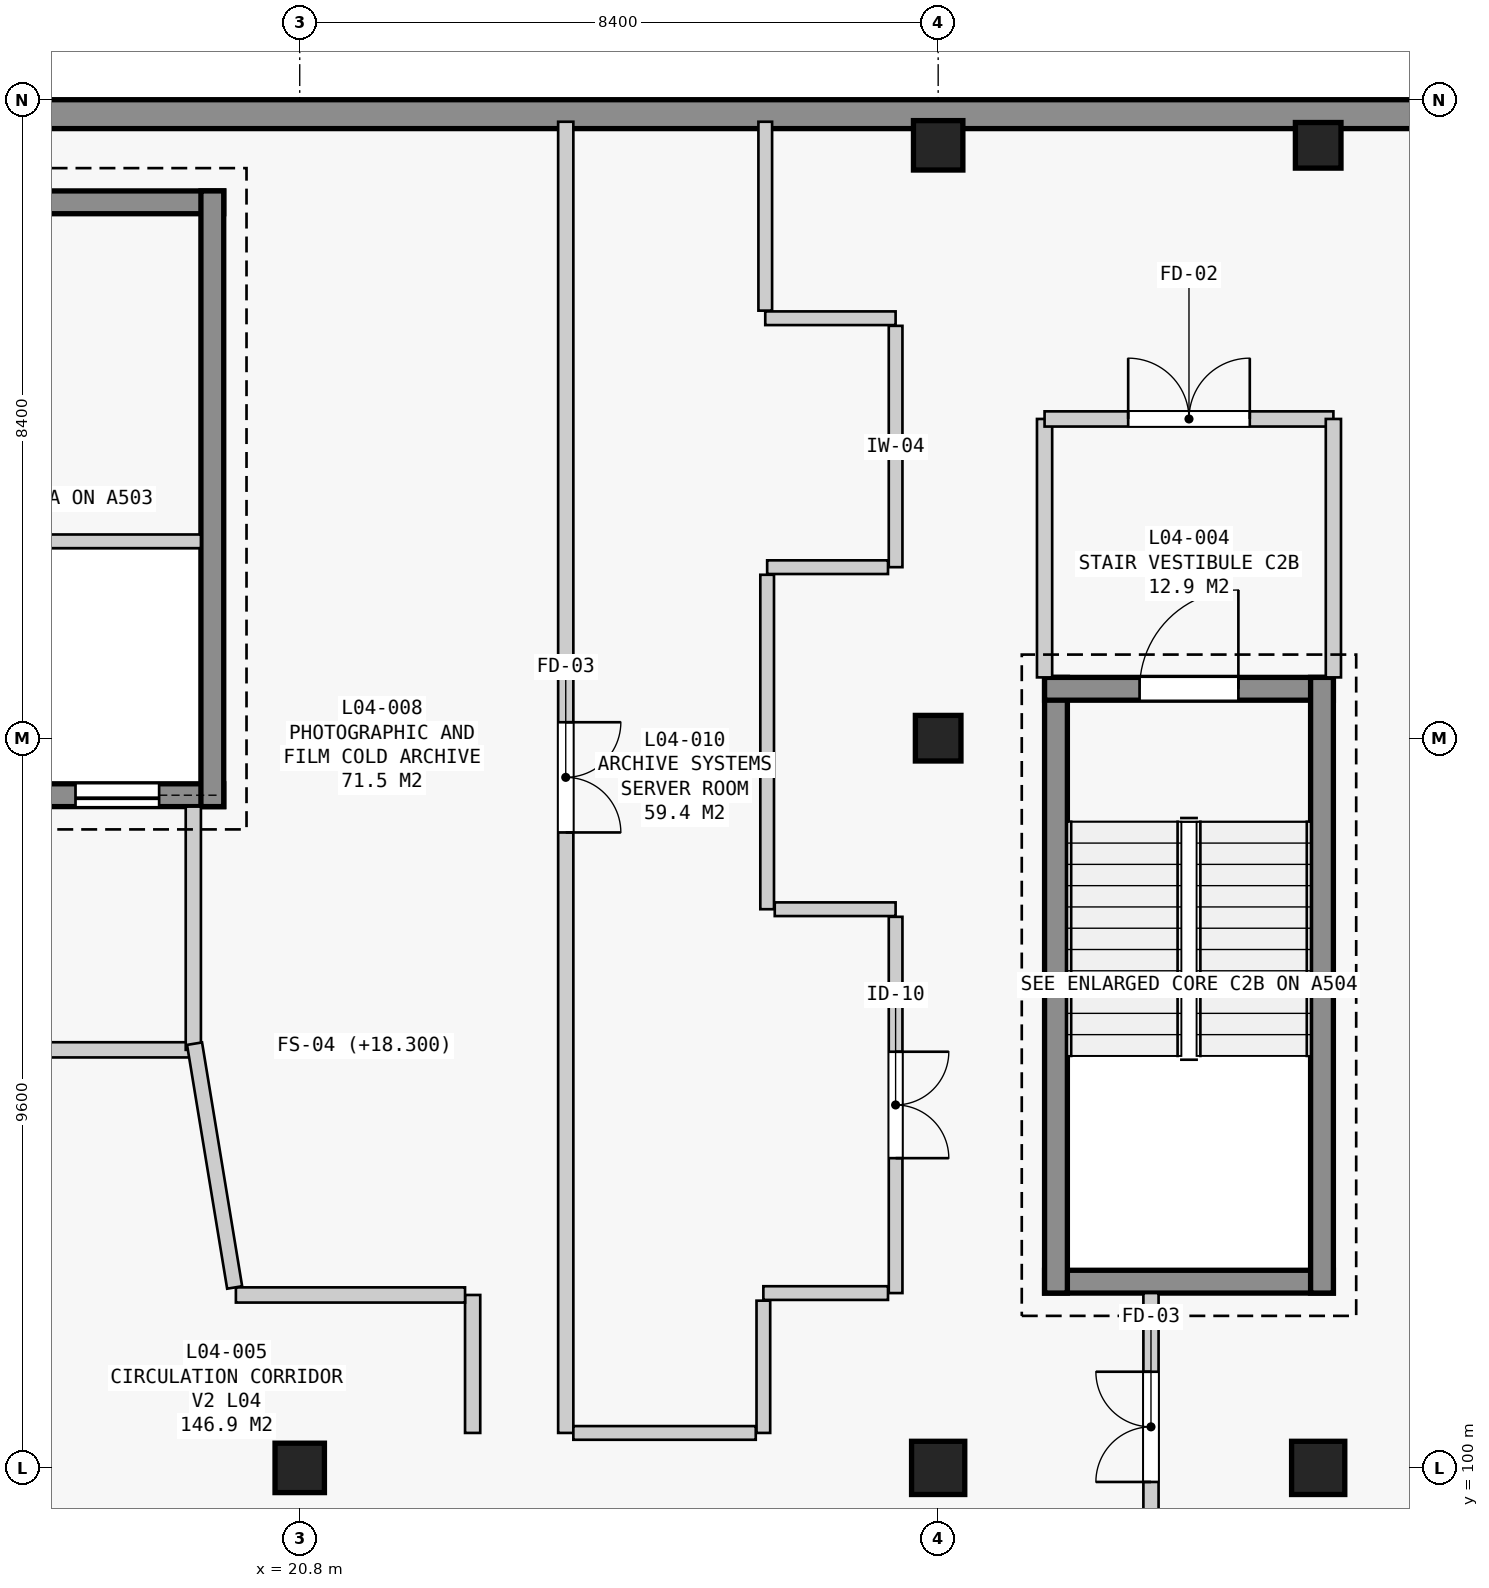
"""IFC4 building model, lengths in metres.
Left out: names, types, materials, properties, quantities, classifications, styles, units other than length and angle.
Written with IfcOpenShell. Run it as: python <this file> out.ifc"""

import sys

from ifc_helpers import new_model, si_unit, direction, frame, frame_2d, origin, origin_2d, place, context, subcontext, project, spatial, rectangle, extrude, element, fill, save


model = new_model("IFC4")
c1 = context("Model", 3, precision=1e-05, world=origin(), true_north=direction((0.0, 1.0)))
c2 = subcontext(c1, "Body", "Model", "MODEL_VIEW")
j1 = project(units=[si_unit("LENGTHUNIT", "METRE"), si_unit("PLANEANGLEUNIT", "RADIAN")], contexts=[c1])
p1 = place(None, origin())
s1 = spatial("IfcSite", under=j1, at=p1, CompositionType="ELEMENT")
p2 = place(p1, origin())
s2 = spatial("IfcBuilding", under=s1, at=p2, CompositionType="ELEMENT")
p3 = place(p2, frame((0.0, 0.0, 18.3)))
s3 = spatial("IfcBuildingStorey", under=s2, at=p3, CompositionType="ELEMENT", Elevation=18.3)
p4 = place(p3, frame((20.8, 100.0, 0.0), z_axis=(0.0, 0.0, 1.0), x_axis=(1.0, 0.0, 0.0)))
e1 = element("IfcColumn", 1, at=p4, inside=s3, PredefinedType="COLUMN", context=c2, shape_type="SweptSolid", body=[
    extrude(rectangle(XDim=0.65, YDim=0.65, at=origin_2d()), origin(), (0.0, 0.0, 1.0), 4.2),
])
p5 = place(p3, frame((29.2, 100.0, 0.0), z_axis=(0.0, 0.0, 1.0), x_axis=(1.0, 0.0, 0.0)))
e2 = element("IfcColumn", 2, at=p5, inside=s3, PredefinedType="COLUMN", context=c2, shape_type="SweptSolid", body=[
    extrude(rectangle(XDim=0.7, YDim=0.7, at=origin_2d()), origin(), (0.0, 0.0, 1.0), 4.2),
])
p6 = place(p3, frame((29.2, 109.6, 0.0), z_axis=(0.0, 0.0, 1.0), x_axis=(1.0, 0.0, 0.0)))
e3 = element("IfcColumn", 3, at=p6, inside=s3, PredefinedType="COLUMN", context=c2, shape_type="SweptSolid", body=[
    extrude(rectangle(XDim=0.6, YDim=0.6, at=origin_2d()), origin(), (0.0, 0.0, 1.0), 4.2),
])
p7 = place(p3, frame((29.2, 117.4, 0.0), z_axis=(0.0, 0.0, 1.0), x_axis=(1.0, 0.0, 0.0)))
e4 = element("IfcColumn", 4, at=p7, inside=s3, PredefinedType="COLUMN", context=c2, shape_type="SweptSolid", body=[
    extrude(rectangle(XDim=0.65, YDim=0.65, at=origin_2d()), origin(), (0.0, 0.0, 1.0), 4.2),
])
p8 = place(p3, frame((34.2, 100.0, 0.0), z_axis=(0.0, 0.0, 1.0), x_axis=(1.0, 0.0, 0.0)))
e5 = element("IfcColumn", 5, at=p8, inside=s3, PredefinedType="COLUMN", context=c2, shape_type="SweptSolid", body=[
    extrude(rectangle(XDim=0.7, YDim=0.7, at=origin_2d()), origin(), (0.0, 0.0, 1.0), 4.2),
])
p9 = place(p3, frame((34.2, 117.4, 0.0), z_axis=(0.0, 0.0, 1.0), x_axis=(1.0, 0.0, 0.0)))
e6 = element("IfcColumn", 6, at=p9, inside=s3, PredefinedType="COLUMN", context=c2, shape_type="SweptSolid", body=[
    extrude(rectangle(XDim=0.6, YDim=0.6, at=origin_2d()), origin(), (0.0, 0.0, 1.0), 4.2),
])
p10 = place(p3, frame((12.59, 117.81, 0.0), z_axis=(0.0, 0.0, 1.0), x_axis=(1.0, 0.0, 0.0)))
e7 = element("IfcWall", 7, at=p10, inside=s3, PredefinedType="STANDARD", context=c2, shape_type="SweptSolid", body=[
    extrude(rectangle(XDim=23.42, YDim=0.38, at=frame_2d((11.71, 0.0))), origin(), (0.0, 0.0, 1.0), 3.88),
])
p11 = place(p3, frame((19.8, 108.85, 0.0), z_axis=(0.0, 0.0, 1.0), x_axis=(-1.0, 0.0, 0.0)))
e8 = element("IfcWall", 8, at=p11, inside=s3, PredefinedType="SHEAR", context=c2, shape_type="SweptSolid", body=[
    extrude(rectangle(XDim=6.3, YDim=0.3, at=frame_2d((3.15, 0.0))), origin(), (0.0, 0.0, 1.0), 3.88),
])
p12 = place(p11, frame((3.75, 0.0, 0.0)))
e9 = element("IfcOpeningElement", 9, at=p12, cuts=e8, PredefinedType="OPENING", context=c2, shape_type="SweptSolid", body=[
    extrude(rectangle(XDim=1.3, YDim=2.2, at=frame_2d((0.65, 1.1))), frame((0.0, 0.16, 0.0), z_axis=(0.0, -1.0, 0.0), x_axis=(1.0, 0.0, 0.0)), (0.0, 0.0, 1.0), 0.32),
])
p13 = place(p11, frame((0.85, 0.0, 0.0)))
e10 = element("IfcOpeningElement", 10, at=p13, cuts=e8, PredefinedType="OPENING", context=c2, shape_type="SweptSolid", body=[
    extrude(rectangle(XDim=1.1, YDim=2.15, at=frame_2d((0.55, 1.075))), frame((0.0, 0.16, 0.0), z_axis=(0.0, -1.0, 0.0), x_axis=(1.0, 0.0, 0.0)), (0.0, 0.0, 1.0), 0.32),
])
p14 = place(p3, frame((13.5, 116.65, 0.0), z_axis=(0.0, 0.0, 1.0), x_axis=(1.0, 0.0, 0.0)))
e11 = element("IfcWall", 11, at=p14, inside=s3, PredefinedType="SHEAR", context=c2, shape_type="SweptSolid", body=[
    extrude(rectangle(XDim=6.3, YDim=0.3, at=frame_2d((3.15, 0.0))), origin(), (0.0, 0.0, 1.0), 3.88),
])
p15 = place(p3, frame((19.65, 116.8, 0.0), z_axis=(0.0, 0.0, 1.0), x_axis=(0.0, -1.0, 0.0)))
e12 = element("IfcWall", 12, at=p15, inside=s3, PredefinedType="SHEAR", context=c2, shape_type="SweptSolid", body=[
    extrude(rectangle(XDim=8.1, YDim=0.3, at=frame_2d((4.05, 0.0))), origin(), (0.0, 0.0, 1.0), 3.88),
])
p16 = place(p3, frame((17.3, 112.19, 0.0), z_axis=(0.0, 0.0, 1.0), x_axis=(1.0, 0.0, 0.0)))
e13 = element("IfcWall", 13, at=p16, inside=s3, PredefinedType="PARTITIONING", context=c2, shape_type="SweptSolid", body=[
    extrude(rectangle(XDim=2.2, YDim=0.18, at=frame_2d((1.1, 0.0))), origin(), (0.0, 0.0, 1.0), 3.88),
])
p17 = place(p3, frame((13.8, 105.5, 0.0), z_axis=(0.0, 0.0, 1.0), x_axis=(1.0, 0.0, 0.0)))
e14 = element("IfcWall", 14, at=p17, inside=s3, PredefinedType="STANDARD", context=c2, shape_type="SweptSolid", body=[
    extrude(rectangle(XDim=5.6, YDim=0.2, at=frame_2d((2.8, 0.0))), origin(), (0.0, 0.0, 1.0), 3.88),
])
p18 = place(p17, frame((2.0, 0.0, 0.0)))
e15 = element("IfcOpeningElement", 15, at=p18, cuts=e14, PredefinedType="OPENING", context=c2, shape_type="SweptSolid", body=[
    extrude(rectangle(XDim=1.6, YDim=2.2, at=frame_2d((0.8, 1.1))), frame((0.0, 0.11, 0.0), z_axis=(0.0, -1.0, 0.0), x_axis=(1.0, 0.0, 0.0)), (0.0, 0.0, 1.0), 0.22),
])
p19 = place(p3, frame((19.4, 105.5, 0.0), z_axis=(0.0, 0.0, 1.0), x_axis=(0.0, 1.0, 0.0)))
e16 = element("IfcWall", 16, at=p19, inside=s3, PredefinedType="STANDARD", context=c2, shape_type="SweptSolid", body=[
    extrude(rectangle(XDim=3.2, YDim=0.2, at=frame_2d((1.6, 0.0))), origin(), (0.0, 0.0, 1.0), 3.88),
])
p20 = place(p3, frame((34.4, 102.45, 0.0), z_axis=(0.0, 0.0, 1.0), x_axis=(-1.0, 0.0, 0.0)))
e17 = element("IfcWall", 17, at=p20, inside=s3, PredefinedType="SHEAR", context=c2, shape_type="SweptSolid", body=[
    extrude(rectangle(XDim=3.8, YDim=0.3, at=frame_2d((1.9, 0.0))), origin(), (0.0, 0.0, 1.0), 3.88),
])
p21 = place(p3, frame((30.75, 102.3, 0.0), z_axis=(0.0, 0.0, 1.0), x_axis=(0.0, 1.0, 0.0)))
e18 = element("IfcWall", 18, at=p21, inside=s3, PredefinedType="SHEAR", context=c2, shape_type="SweptSolid", body=[
    extrude(rectangle(XDim=8.1, YDim=0.3, at=frame_2d((4.05, 0.0))), origin(), (0.0, 0.0, 1.0), 3.88),
])
p22 = place(p3, frame((30.6, 110.25, 0.0), z_axis=(0.0, 0.0, 1.0), x_axis=(1.0, 0.0, 0.0)))
e19 = element("IfcWall", 19, at=p22, inside=s3, PredefinedType="SHEAR", context=c2, shape_type="SweptSolid", body=[
    extrude(rectangle(XDim=3.8, YDim=0.3, at=frame_2d((1.9, 0.0))), origin(), (0.0, 0.0, 1.0), 3.88),
])
p23 = place(p22, frame((1.25, 0.0, 0.0)))
e20 = element("IfcOpeningElement", 20, at=p23, cuts=e19, PredefinedType="OPENING", context=c2, shape_type="SweptSolid", body=[
    extrude(rectangle(XDim=1.3, YDim=2.2, at=frame_2d((0.65, 1.1))), frame((0.0, 0.16, 0.0), z_axis=(0.0, -1.0, 0.0), x_axis=(1.0, 0.0, 0.0)), (0.0, 0.0, 1.0), 0.32),
])
p24 = place(p3, frame((34.25, 110.4, 0.0), z_axis=(0.0, 0.0, 1.0), x_axis=(0.0, -1.0, 0.0)))
e21 = element("IfcWall", 21, at=p24, inside=s3, PredefinedType="SHEAR", context=c2, shape_type="SweptSolid", body=[
    extrude(rectangle(XDim=8.1, YDim=0.3, at=frame_2d((4.05, 0.0))), origin(), (0.0, 0.0, 1.0), 3.88),
])
p25 = place(p3, frame((30.6, 110.4, 0.0), z_axis=(0.0, 0.0, 1.0), x_axis=(0.0, 1.0, 0.0)))
e22 = element("IfcWall", 22, at=p25, inside=s3, PredefinedType="STANDARD", context=c2, shape_type="SweptSolid", body=[
    extrude(rectangle(XDim=3.4, YDim=0.2, at=frame_2d((1.7, 0.0))), origin(), (0.0, 0.0, 1.0), 3.88),
])
p26 = place(p3, frame((30.6, 113.8, 0.0), z_axis=(0.0, 0.0, 1.0), x_axis=(1.0, 0.0, 0.0)))
e23 = element("IfcWall", 23, at=p26, inside=s3, PredefinedType="STANDARD", context=c2, shape_type="SweptSolid", body=[
    extrude(rectangle(XDim=3.8, YDim=0.2, at=frame_2d((1.9, 0.0))), origin(), (0.0, 0.0, 1.0), 3.88),
])
p27 = place(p26, frame((1.1, 0.0, 0.0)))
e24 = element("IfcOpeningElement", 24, at=p27, cuts=e23, PredefinedType="OPENING", context=c2, shape_type="SweptSolid", body=[
    extrude(rectangle(XDim=1.6, YDim=2.2, at=frame_2d((0.8, 1.1))), frame((0.0, 0.11, 0.0), z_axis=(0.0, -1.0, 0.0), x_axis=(1.0, 0.0, 0.0)), (0.0, 0.0, 1.0), 0.22),
])
p28 = place(p3, frame((34.4, 113.8, 0.0), z_axis=(0.0, 0.0, 1.0), x_axis=(0.0, -1.0, 0.0)))
e25 = element("IfcWall", 25, at=p28, inside=s3, PredefinedType="STANDARD", context=c2, shape_type="SweptSolid", body=[
    extrude(rectangle(XDim=3.4, YDim=0.2, at=frame_2d((1.7, 0.0))), origin(), (0.0, 0.0, 1.0), 3.88),
])
p29 = place(p3, frame((23.075, 100.46, 0.0), z_axis=(0.0, 0.0, 1.0), x_axis=(0.0, 1.0, 0.0)))
e26 = element("IfcWall", 26, at=p29, inside=s3, PredefinedType="STANDARD", context=c2, shape_type="SweptSolid", body=[
    extrude(rectangle(XDim=1.815, YDim=0.2, at=frame_2d((0.907, 0.0))), origin(), (0.0, 0.0, 1.0), 3.88),
])
p30 = place(p3, frame((22.975, 102.275, 0.0), z_axis=(0.0, 0.0, 1.0), x_axis=(-1.0, 0.0, 0.0)))
e27 = element("IfcWall", 27, at=p30, inside=s3, PredefinedType="STANDARD", context=c2, shape_type="SweptSolid", body=[
    extrude(rectangle(XDim=3.015, YDim=0.2, at=frame_2d((1.508, 0.0))), origin(), (0.0, 0.0, 1.0), 3.88),
])
p31 = place(p3, frame((19.944, 102.374, 0.0), z_axis=(0.0, 0.0, 1.0), x_axis=(-0.162303771926, 0.986740840149, 0.0)))
e28 = element("IfcWall", 28, at=p31, inside=s3, PredefinedType="STANDARD", context=c2, shape_type="SweptSolid", body=[
    extrude(rectangle(XDim=3.251, YDim=0.2, at=frame_2d((1.625, 0.0))), origin(), (0.0, 0.0, 1.0), 3.88),
])
p32 = place(p3, frame((24.3, 117.71, 0.0), z_axis=(0.0, 0.0, 1.0), x_axis=(0.0, -1.0, 0.0)))
e29 = element("IfcWall", 29, at=p32, inside=s3, PredefinedType="STANDARD", context=c2, shape_type="SweptSolid", body=[
    extrude(rectangle(XDim=17.25, YDim=0.2, at=frame_2d((8.625, 0.0))), origin(), (0.0, 0.0, 1.0), 3.88),
])
p33 = place(p32, frame((7.9, 0.0, 0.0)))
e30 = element("IfcOpeningElement", 30, at=p33, cuts=e29, PredefinedType="OPENING", context=c2, shape_type="SweptSolid", body=[
    extrude(rectangle(XDim=1.45, YDim=2.2, at=frame_2d((0.725, 1.1))), frame((0.0, 0.11, 0.0), z_axis=(0.0, -1.0, 0.0), x_axis=(1.0, 0.0, 0.0)), (0.0, 0.0, 1.0), 0.22),
])
p34 = place(p3, frame((26.925, 115.125, 0.0), z_axis=(0.0, 0.0, 1.0), x_axis=(1.0, 0.0, 0.0)))
e31 = element("IfcWall", 31, at=p34, inside=s3, PredefinedType="PARTITIONING", context=c2, shape_type="SweptSolid", body=[
    extrude(rectangle(XDim=1.715, YDim=0.18, at=frame_2d((0.857, 0.0))), origin(), (0.0, 0.0, 1.0), 3.88),
])
p35 = place(p3, frame((28.64, 115.025, 0.0), z_axis=(0.0, 0.0, 1.0), x_axis=(0.0, -1.0, 0.0)))
e32 = element("IfcWall", 32, at=p35, inside=s3, PredefinedType="PARTITIONING", context=c2, shape_type="SweptSolid", body=[
    extrude(rectangle(XDim=3.175, YDim=0.18, at=frame_2d((1.587, 0.0))), origin(), (0.0, 0.0, 1.0), 3.88),
])
p36 = place(p3, frame((28.54, 111.85, 0.0), z_axis=(0.0, 0.0, 1.0), x_axis=(-1.0, 0.0, 0.0)))
e33 = element("IfcWall", 33, at=p36, inside=s3, PredefinedType="PARTITIONING", context=c2, shape_type="SweptSolid", body=[
    extrude(rectangle(XDim=1.59, YDim=0.18, at=frame_2d((0.795, 0.0))), origin(), (0.0, 0.0, 1.0), 3.88),
])
p37 = place(p3, frame((26.95, 111.75, 0.0), z_axis=(0.0, 0.0, 1.0), x_axis=(0.0, -1.0, 0.0)))
e34 = element("IfcWall", 34, at=p37, inside=s3, PredefinedType="PARTITIONING", context=c2, shape_type="SweptSolid", body=[
    extrude(rectangle(XDim=4.4, YDim=0.18, at=frame_2d((2.2, 0.0))), origin(), (0.0, 0.0, 1.0), 3.88),
])
p38 = place(p3, frame((27.05, 107.35, 0.0), z_axis=(0.0, 0.0, 1.0), x_axis=(1.0, 0.0, 0.0)))
e35 = element("IfcWall", 35, at=p38, inside=s3, PredefinedType="PARTITIONING", context=c2, shape_type="SweptSolid", body=[
    extrude(rectangle(XDim=1.59, YDim=0.18, at=frame_2d((0.795, 0.0))), origin(), (0.0, 0.0, 1.0), 3.88),
])
p39 = place(p3, frame((28.64, 107.25, 0.0), z_axis=(0.0, 0.0, 1.0), x_axis=(0.0, -1.0, 0.0)))
e36 = element("IfcWall", 36, at=p39, inside=s3, PredefinedType="PARTITIONING", context=c2, shape_type="SweptSolid", body=[
    extrude(rectangle(XDim=4.95, YDim=0.18, at=frame_2d((2.475, 0.0))), origin(), (0.0, 0.0, 1.0), 3.88),
])
p40 = place(p39, frame((1.775, 0.0, 0.0)))
e37 = element("IfcOpeningElement", 37, at=p40, cuts=e36, PredefinedType="OPENING", context=c2, shape_type="SweptSolid", body=[
    extrude(rectangle(XDim=1.4, YDim=2.2, at=frame_2d((0.7, 1.1))), frame((0.0, 0.1, 0.0), z_axis=(0.0, -1.0, 0.0), x_axis=(1.0, 0.0, 0.0)), (0.0, 0.0, 1.0), 0.2),
])
p41 = place(p3, frame((28.54, 102.3, 0.0), z_axis=(0.0, 0.0, 1.0), x_axis=(-1.0, 0.0, 0.0)))
e38 = element("IfcWall", 38, at=p41, inside=s3, PredefinedType="PARTITIONING", context=c2, shape_type="SweptSolid", body=[
    extrude(rectangle(XDim=1.64, YDim=0.18, at=frame_2d((0.82, 0.0))), origin(), (0.0, 0.0, 1.0), 3.88),
])
p42 = place(p3, frame((26.9, 102.2, 0.0), z_axis=(0.0, 0.0, 1.0), x_axis=(0.0, -1.0, 0.0)))
e39 = element("IfcWall", 39, at=p42, inside=s3, PredefinedType="PARTITIONING", context=c2, shape_type="SweptSolid", body=[
    extrude(rectangle(XDim=1.74, YDim=0.18, at=frame_2d((0.87, 0.0))), origin(), (0.0, 0.0, 1.0), 3.88),
])
p43 = place(p3, frame((26.8, 100.46, 0.0), z_axis=(0.0, 0.0, 1.0), x_axis=(-1.0, 0.0, 0.0)))
e40 = element("IfcWall", 40, at=p43, inside=s3, PredefinedType="PARTITIONING", context=c2, shape_type="SweptSolid", body=[
    extrude(rectangle(XDim=2.4, YDim=0.18, at=frame_2d((1.2, 0.0))), origin(), (0.0, 0.0, 1.0), 3.88),
])
p44 = place(p3, frame((26.925, 117.71, 0.0), z_axis=(0.0, 0.0, 1.0), x_axis=(0.0, -1.0, 0.0)))
e41 = element("IfcWall", 41, at=p44, inside=s3, PredefinedType="PARTITIONING", context=c2, shape_type="SweptSolid", body=[
    extrude(rectangle(XDim=2.485, YDim=0.18, at=frame_2d((1.242, 0.0))), origin(), (0.0, 0.0, 1.0), 3.88),
])
p45 = place(p3, frame((32.0, 98.78, 0.0), z_axis=(0.0, 0.0, 1.0), x_axis=(0.0, 1.0, 0.0)))
e42 = element("IfcWall", 42, at=p45, inside=s3, PredefinedType="STANDARD", context=c2, shape_type="SweptSolid", body=[
    extrude(rectangle(XDim=3.52, YDim=0.2, at=frame_2d((1.76, 0.0))), origin(), (0.0, 0.0, 1.0), 3.16),
])
p46 = place(p45, frame((1.035, 0.0, 0.0)))
e43 = element("IfcOpeningElement", 43, at=p46, cuts=e42, PredefinedType="OPENING", context=c2, shape_type="SweptSolid", body=[
    extrude(rectangle(XDim=1.45, YDim=2.2, at=frame_2d((0.725, 1.1))), frame((0.0, 0.11, 0.0), z_axis=(0.0, -1.0, 0.0), x_axis=(1.0, 0.0, 0.0)), (0.0, 0.0, 1.0), 0.22),
])
p47 = place(p13, origin())
e44 = element("IfcDoor", 44, at=p47, inside=s3, OperationType="SLIDING_TO_LEFT", PredefinedType="DOOR", context=c2, shape_type="SweptSolid", body=[
    extrude(rectangle(XDim=1.1, YDim=2.15, at=frame_2d((0.55, 1.075))), frame((0.0, 0.025, 0.0), z_axis=(0.0, -1.0, 0.0), x_axis=(1.0, 0.0, 0.0)), (0.0, 0.0, 1.0), 0.05),
])
fill(e10, e44)
p48 = place(p23, origin())
e45 = element("IfcDoor", 45, at=p48, inside=s3, OperationType="SINGLE_SWING_RIGHT", PredefinedType="DOOR", context=c2, shape_type="SweptSolid", body=[
    extrude(rectangle(XDim=1.3, YDim=2.2, at=frame_2d((0.65, 1.1))), frame((0.0, 0.025, 0.0), z_axis=(0.0, -1.0, 0.0), x_axis=(1.0, 0.0, 0.0)), (0.0, 0.0, 1.0), 0.05),
])
fill(e20, e45)
p49 = place(p27, origin())
e46 = element("IfcDoor", 46, at=p49, inside=s3, OperationType="DOUBLE_DOOR_SINGLE_SWING", PredefinedType="DOOR", context=c2, shape_type="SweptSolid", body=[
    extrude(rectangle(XDim=1.6, YDim=2.2, at=frame_2d((0.8, 1.1))), frame((0.0, 0.025, 0.0), z_axis=(0.0, -1.0, 0.0), x_axis=(1.0, 0.0, 0.0)), (0.0, 0.0, 1.0), 0.05),
])
fill(e24, e46)
p50 = place(p33, origin())
e47 = element("IfcDoor", 47, at=p50, inside=s3, OperationType="DOUBLE_DOOR_SINGLE_SWING", PredefinedType="DOOR", context=c2, shape_type="SweptSolid", body=[
    extrude(rectangle(XDim=1.45, YDim=2.2, at=frame_2d((0.725, 1.1))), frame((0.0, 0.025, 0.0), z_axis=(0.0, -1.0, 0.0), x_axis=(1.0, 0.0, 0.0)), (0.0, 0.0, 1.0), 0.05),
])
fill(e30, e47)
p51 = place(p40, origin())
e48 = element("IfcDoor", 48, at=p51, inside=s3, OperationType="DOUBLE_DOOR_SINGLE_SWING", PredefinedType="DOOR", context=c2, shape_type="SweptSolid", body=[
    extrude(rectangle(XDim=1.4, YDim=2.2, at=frame_2d((0.7, 1.1))), frame((0.0, 0.025, 0.0), z_axis=(0.0, -1.0, 0.0), x_axis=(1.0, 0.0, 0.0)), (0.0, 0.0, 1.0), 0.05),
])
fill(e37, e48)
p52 = place(p46, origin())
e49 = element("IfcDoor", 49, at=p52, inside=s3, OperationType="DOUBLE_DOOR_SINGLE_SWING", PredefinedType="DOOR", context=c2, shape_type="SweptSolid", body=[
    extrude(rectangle(XDim=1.45, YDim=2.2, at=frame_2d((0.725, 1.1))), frame((0.0, 0.025, 0.0), z_axis=(0.0, -1.0, 0.0), x_axis=(1.0, 0.0, 0.0)), (0.0, 0.0, 1.0), 0.05),
])
fill(e43, e49)
save(model, sys.argv[1])
